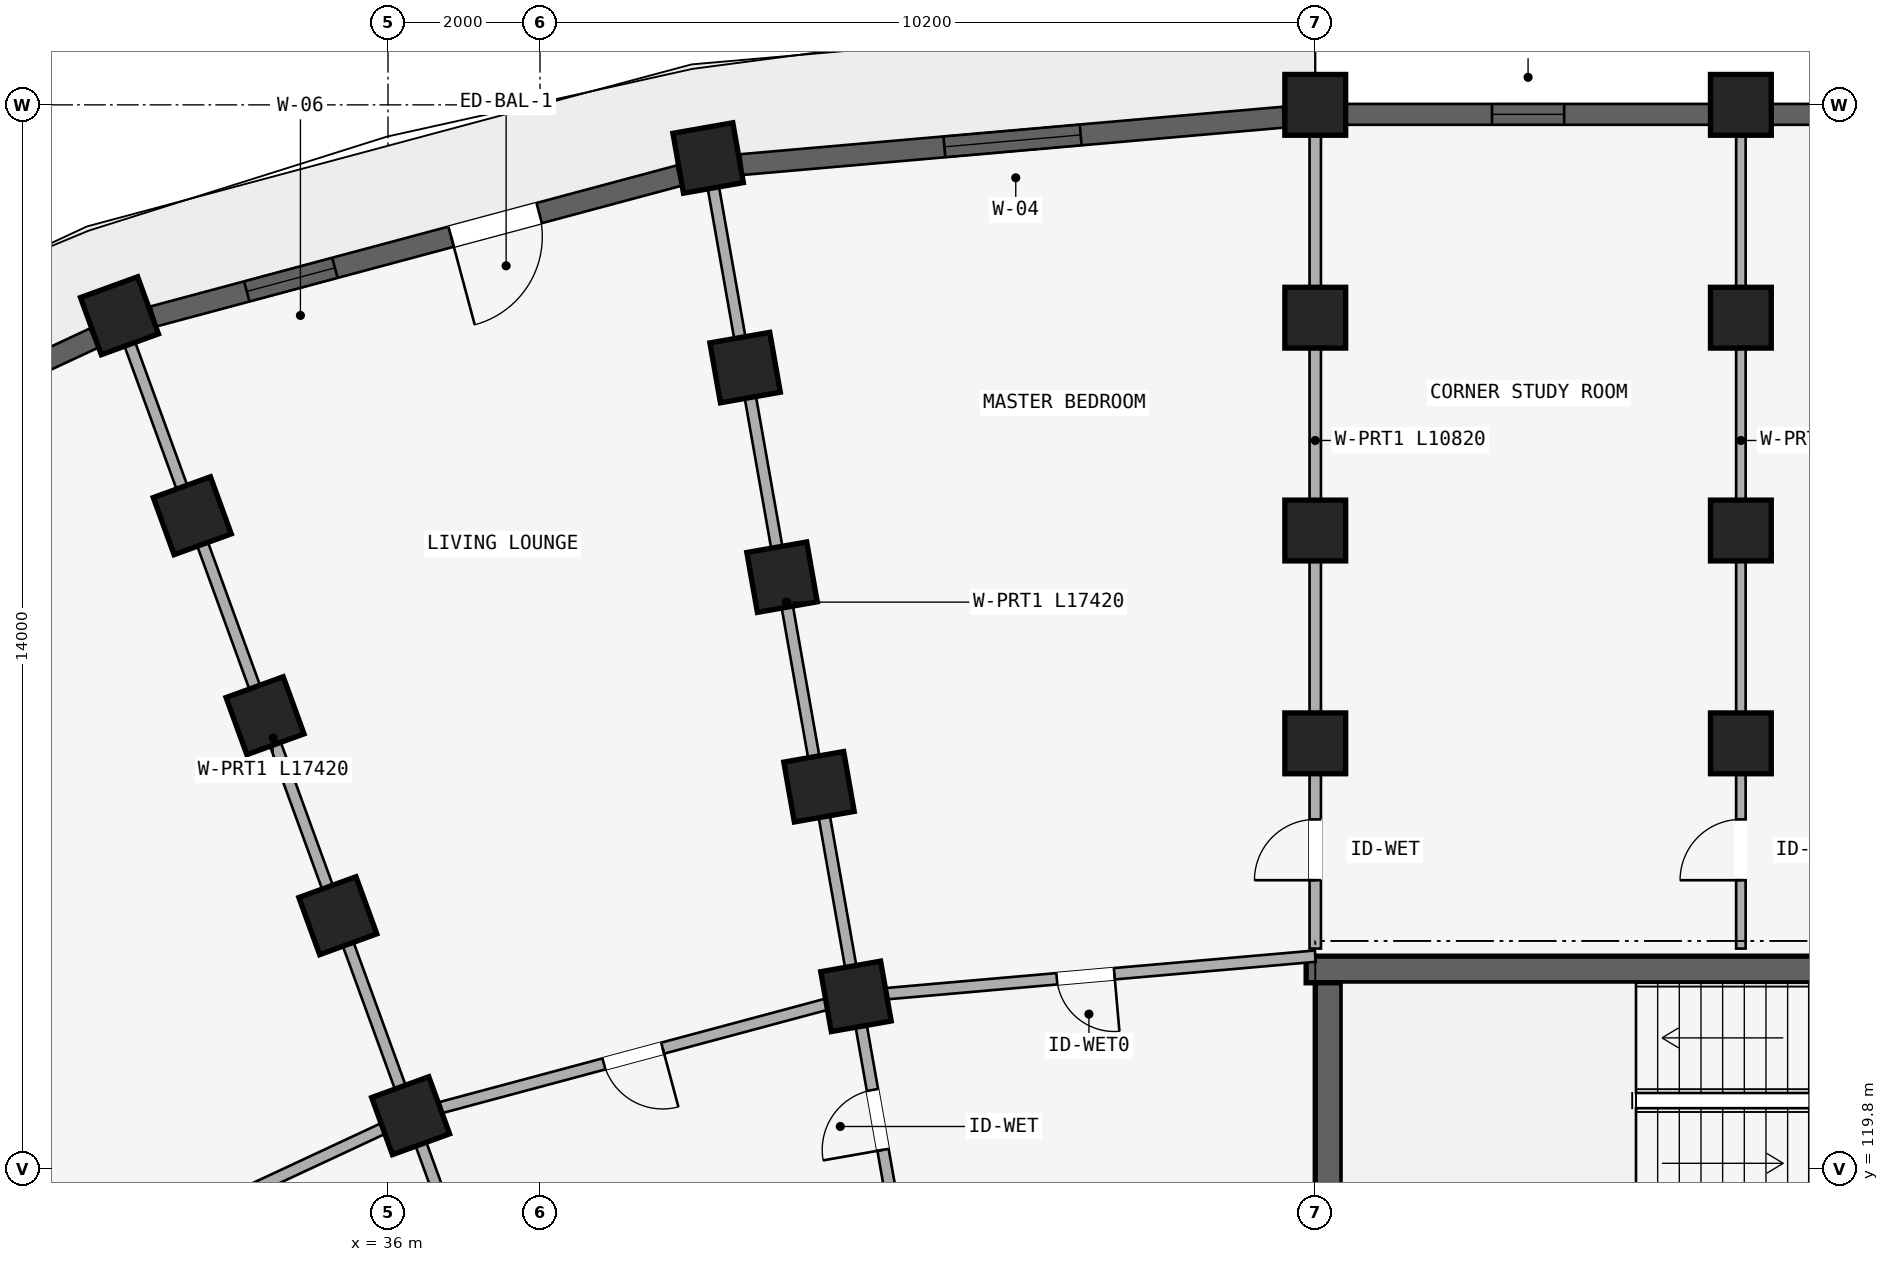
"""IFC4 building model, lengths in metres.
Left out: names, types, materials, properties, quantities, classifications, styles, units other than length and angle.
Written with IfcOpenShell. Run it as: python <this file> out.ifc"""

import sys

from ifc_helpers import new_model, si_unit, direction, frame, frame_2d, origin, origin_2d, place, context, subcontext, project, spatial, rectangle, extrude, element, fill, save


model = new_model("IFC4")
c1 = context("Model", 3, precision=1e-05, world=origin(), true_north=direction((0.0, 1.0)))
c2 = subcontext(c1, "Body", "Model", "MODEL_VIEW")
j1 = project(units=[si_unit("LENGTHUNIT", "METRE"), si_unit("PLANEANGLEUNIT", "RADIAN")], contexts=[c1])
p1 = place(None, origin())
s1 = spatial("IfcSite", under=j1, at=p1, CompositionType="ELEMENT")
p2 = place(p1, origin())
s2 = spatial("IfcBuilding", under=s1, at=p2, CompositionType="ELEMENT")
p3 = place(p2, frame((0.0, 0.0, 8.7)))
s3 = spatial("IfcBuildingStorey", under=s2, at=p3, CompositionType="ELEMENT", Elevation=8.7)
p4 = place(p3, frame((48.08, 122.425, 0.0), z_axis=(0.0, 0.0, 1.0), x_axis=(1.0, 0.0, 0.0)))
e1 = element("IfcWall", 1, at=p4, inside=s3, PredefinedType="SHEAR", context=c2, shape_type="SweptSolid", body=[
    extrude(rectangle(XDim=8.545, YDim=0.35, at=frame_2d((4.272, 0.0))), origin(), (0.0, 0.0, 1.0), 2.93),
])
p5 = place(p3, frame((48.375, 118.65, 0.0), z_axis=(0.0, 0.0, 1.0), x_axis=(0.0, 1.0, 0.0)))
e2 = element("IfcWall", 2, at=p5, inside=s3, PredefinedType="SHEAR", context=c2, shape_type="SweptSolid", body=[
    extrude(rectangle(XDim=3.6, YDim=0.35, at=frame_2d((1.8, 0.0))), origin(), (0.0, 0.0, 1.0), 2.93),
])
for number, where, z_axis, x_axis in (
    (3, (48.2, 125.4, 0.0), (0.0, 0.0, 1.0), (1.0, 0.0, 0.0)),
    (4, (48.2, 128.2, 0.0), (0.0, 0.0, 1.0), (1.0, 0.0, 0.0)),
    (5, (48.2, 131.0, 0.0), (0.0, 0.0, 1.0), (1.0, 0.0, 0.0)),
    (6, (48.2, 133.8, 0.0), (0.0, 0.0, 1.0), (1.0, 0.0, 0.0)),
    (7, (42.157, 122.071, 0.0), (0.0, 0.0, 1.0), (0.985, 0.174, 0.0)),
    (8, (41.671, 124.829, 0.0), (0.0, 0.0, 1.0), (0.985, 0.174, 0.0)),
    (9, (41.185, 127.586, 0.0), (0.0, 0.0, 1.0), (0.985, 0.174, 0.0)),
    (10, (40.698, 130.344, 0.0), (0.0, 0.0, 1.0), (0.985, 0.174, 0.0)),
    (11, (40.212, 133.101, 0.0), (0.0, 0.0, 1.0), (0.985, 0.174, 0.0)),
    (12, (36.298, 120.501, 0.0), (0.0, 0.0, 1.0), (0.94, 0.342, 0.0)),
    (13, (35.34, 123.132, 0.0), (0.0, 0.0, 1.0), (0.94, 0.342, 0.0)),
    (14, (34.382, 125.764, 0.0), (0.0, 0.0, 1.0), (0.94, 0.342, 0.0)),
    (15, (33.425, 128.395, 0.0), (0.0, 0.0, 1.0), (0.94, 0.342, 0.0)),
    (16, (32.467, 131.026, 0.0), (0.0, 0.0, 1.0), (0.94, 0.342, 0.0)),
    (17, (53.8, 125.4, 0.0), (0.0, 0.0, 1.0), (1.0, 0.0, 0.0)),
    (18, (53.8, 128.2, 0.0), (0.0, 0.0, 1.0), (1.0, 0.0, 0.0)),
    (19, (53.8, 131.0, 0.0), (0.0, 0.0, 1.0), (1.0, 0.0, 0.0)),
    (20, (53.8, 133.8, 0.0), (0.0, 0.0, 1.0), (1.0, 0.0, 0.0)),
):
    element("IfcColumn", number, at=place(p3, frame(where, z_axis=z_axis, x_axis=x_axis)), inside=s3, PredefinedType="COLUMN", context=c2, shape_type="SweptSolid", body=[
        extrude(rectangle(XDim=0.8, YDim=0.8, at=origin_2d()), origin(), (0.0, 0.0, 1.0), 2.93),
    ])
p6 = place(p3, frame((53.8, 122.7, 0.0), z_axis=(0.0, 0.0, 1.0), x_axis=(0.0, 1.0, 0.0)))
e21 = element("IfcWall", 21, at=p6, inside=s3, PredefinedType="PARTITIONING", context=c2, shape_type="SweptSolid", body=[
    extrude(rectangle(XDim=10.82, YDim=0.125, at=frame_2d((5.41, 0.0))), origin(), (0.0, 0.0, 1.0), 2.372),
])
p7 = place(p6, frame((0.899, 0.0, 0.0)))
e22 = element("IfcOpeningElement", 22, at=p7, cuts=e21, PredefinedType="OPENING", context=c2, shape_type="SweptSolid", body=[
    extrude(rectangle(XDim=0.8, YDim=2.1, at=frame_2d((0.4, 1.05))), frame((0.0, 0.073, 0.0), z_axis=(0.0, -1.0, 0.0), x_axis=(1.0, 0.0, 0.0)), (0.0, 0.0, 1.0), 0.145),
])
p8 = place(p3, frame((48.2, 122.7, 0.0), z_axis=(0.0, 0.0, 1.0), x_axis=(0.0, 1.0, 0.0)))
e23 = element("IfcWall", 23, at=p8, inside=s3, PredefinedType="PARTITIONING", context=c2, shape_type="SweptSolid", body=[
    extrude(rectangle(XDim=10.82, YDim=0.15, at=frame_2d((5.41, 0.0))), origin(), (0.0, 0.0, 1.0), 2.372),
])
p9 = place(p8, frame((0.899, 0.0, 0.0)))
e24 = element("IfcOpeningElement", 24, at=p9, cuts=e23, PredefinedType="OPENING", context=c2, shape_type="SweptSolid", body=[
    extrude(rectangle(XDim=0.8, YDim=2.1, at=frame_2d((0.4, 1.05))), frame((0.0, 0.085, 0.0), z_axis=(0.0, -1.0, 0.0), x_axis=(1.0, 0.0, 0.0)), (0.0, 0.0, 1.0), 0.17),
])
p10 = place(p3, frame((43.286, 115.67, 0.0), z_axis=(0.0, 0.0, 1.0), x_axis=(-0.173646216546, 0.984808098809, 0.0)))
e25 = element("IfcWall", 25, at=p10, inside=s3, PredefinedType="PARTITIONING", context=c2, shape_type="SweptSolid", body=[
    extrude(rectangle(XDim=17.42, YDim=0.15, at=frame_2d((8.71, 0.0))), origin(), (0.0, 0.0, 1.0), 2.372),
])
p11 = place(p10, frame((4.45, 0.0, 0.0)))
e26 = element("IfcOpeningElement", 26, at=p11, cuts=e25, PredefinedType="OPENING", context=c2, shape_type="SweptSolid", body=[
    extrude(rectangle(XDim=0.8, YDim=2.1, at=frame_2d((0.4, 1.05))), frame((0.0, 0.085, 0.0), z_axis=(0.0, -1.0, 0.0), x_axis=(1.0, 0.0, 0.0)), (0.0, 0.0, 1.0), 0.17),
])
p12 = place(p3, frame((38.521, 114.393, 0.0), z_axis=(0.0, 0.0, 1.0), x_axis=(-0.342022120477, 0.939691901159, 0.0)))
e27 = element("IfcWall", 27, at=p12, inside=s3, PredefinedType="PARTITIONING", context=c2, shape_type="SweptSolid", body=[
    extrude(rectangle(XDim=17.42, YDim=0.15, at=frame_2d((8.71, 0.0))), origin(), (0.0, 0.0, 1.0), 2.372),
])
p13 = place(p12, frame((4.45, 0.0, 0.0)))
e28 = element("IfcOpeningElement", 28, at=p13, cuts=e27, PredefinedType="OPENING", context=c2, shape_type="SweptSolid", body=[
    extrude(rectangle(XDim=0.8, YDim=2.1, at=frame_2d((0.4, 1.05))), frame((0.0, 0.085, 0.0), z_axis=(0.0, -1.0, 0.0), x_axis=(1.0, 0.0, 0.0)), (0.0, 0.0, 1.0), 0.17),
])
p14 = place(p3, frame((34.05, 112.309, 0.0), z_axis=(0.0, 0.0, 1.0), x_axis=(-0.499997843263, 0.866026648973, 0.0)))
e29 = element("IfcWall", 29, at=p14, inside=s3, PredefinedType="STANDARD", context=c2, shape_type="SweptSolid", body=[
    extrude(rectangle(XDim=17.42, YDim=0.23, at=frame_2d((8.71, 0.0))), origin(), (0.0, 0.0, 1.0), 2.372),
])
p15 = place(p3, frame((48.2, 122.6, 0.0), z_axis=(0.0, 0.0, 1.0), x_axis=(-0.996193018494, -0.087174938512, 0.0)))
e30 = element("IfcWall", 30, at=p15, inside=s3, PredefinedType="PLUMBINGWALL", context=c2, shape_type="SweptSolid", body=[
    extrude(rectangle(XDim=6.066, YDim=0.15, at=frame_2d((3.033, 0.0))), origin(), (0.0, 0.0, 1.0), 2.372),
])
p16 = place(p15, frame((2.653, 0.0, 0.0)))
e31 = element("IfcOpeningElement", 31, at=p16, cuts=e30, PredefinedType="OPENING", context=c2, shape_type="SweptSolid", body=[
    extrude(rectangle(XDim=0.76, YDim=2.05, at=frame_2d((0.38, 1.025))), frame((0.0, 0.085, 0.0), z_axis=(0.0, -1.0, 0.0), x_axis=(1.0, 0.0, 0.0)), (0.0, 0.0, 1.0), 0.17),
])
p17 = place(p3, frame((42.157, 122.071, 0.0), z_axis=(0.0, 0.0, 1.0), x_axis=(-0.965923618901, -0.258827283048, 0.0)))
e32 = element("IfcWall", 32, at=p17, inside=s3, PredefinedType="PLUMBINGWALL", context=c2, shape_type="SweptSolid", body=[
    extrude(rectangle(XDim=6.066, YDim=0.15, at=frame_2d((3.033, 0.0))), origin(), (0.0, 0.0, 1.0), 2.372),
])
p18 = place(p17, frame((2.633, 0.0, 0.0)))
e33 = element("IfcOpeningElement", 33, at=p18, cuts=e32, PredefinedType="OPENING", context=c2, shape_type="SweptSolid", body=[
    extrude(rectangle(XDim=0.8, YDim=2.1, at=frame_2d((0.4, 1.05))), frame((0.0, 0.085, 0.0), z_axis=(0.0, -1.0, 0.0), x_axis=(1.0, 0.0, 0.0)), (0.0, 0.0, 1.0), 0.17),
])
p19 = place(p3, frame((36.298, 120.501, 0.0), z_axis=(0.0, 0.0, 1.0), x_axis=(-0.906312656069, -0.42260781991, 0.0)))
e34 = element("IfcWall", 34, at=p19, inside=s3, PredefinedType="PLUMBINGWALL", context=c2, shape_type="SweptSolid", body=[
    extrude(rectangle(XDim=6.066, YDim=0.15, at=frame_2d((3.033, 0.0))), origin(), (0.0, 0.0, 1.0), 2.372),
])
p20 = place(p19, frame((2.613, 0.0, 0.0)))
e35 = element("IfcOpeningElement", 35, at=p20, cuts=e34, PredefinedType="OPENING", context=c2, shape_type="SweptSolid", body=[
    extrude(rectangle(XDim=0.84, YDim=2.1, at=frame_2d((0.42, 1.05))), frame((0.0, 0.085, 0.0), z_axis=(0.0, -1.0, 0.0), x_axis=(1.0, 0.0, 0.0)), (0.0, 0.0, 1.0), 0.17),
])
p21 = place(p3, frame((47.785, 133.638, 0.0), z_axis=(0.0, 0.0, 1.0), x_axis=(-0.99619608453, -0.08713989423, 0.0)))
e36 = element("IfcWall", 36, at=p21, inside=s3, PredefinedType="STANDARD", context=c2, shape_type="SweptSolid", body=[
    extrude(rectangle(XDim=7.164, YDim=0.275, at=frame_2d((3.582, 0.0))), origin(), (0.0, 0.0, 1.0), 2.472),
])
p22 = place(p21, frame((2.682, 0.0, 0.622)))
e37 = element("IfcOpeningElement", 37, at=p22, cuts=e36, PredefinedType="OPENING", context=c2, shape_type="SweptSolid", body=[
    extrude(rectangle(XDim=1.8, YDim=1.65, at=frame_2d((0.9, 0.825))), frame((0.0, 0.147, 0.0), z_axis=(0.0, -1.0, 0.0), x_axis=(1.0, 0.0, 0.0)), (0.0, 0.0, 1.0), 0.295),
])
p23 = place(p3, frame((39.832, 132.87, 0.0), z_axis=(0.0, 0.0, 1.0), x_axis=(-0.965923712619, -0.258826933296, 0.0)))
e38 = element("IfcWall", 38, at=p23, inside=s3, PredefinedType="STANDARD", context=c2, shape_type="SweptSolid", body=[
    extrude(rectangle(XDim=7.164, YDim=0.275, at=frame_2d((3.582, 0.0))), origin(), (0.0, 0.0, 1.0), 2.472),
])
p24 = place(p23, frame((4.69, 0.0, 0.522)))
e39 = element("IfcOpeningElement", 39, at=p24, cuts=e38, PredefinedType="OPENING", context=c2, shape_type="SweptSolid", body=[
    extrude(rectangle(XDim=1.2, YDim=1.5, at=frame_2d((0.6, 0.75))), frame((0.0, 0.147, 0.0), z_axis=(0.0, -1.0, 0.0), x_axis=(1.0, 0.0, 0.0)), (0.0, 0.0, 1.0), 0.295),
])
p25 = place(p23, frame((1.907, 0.0, 0.0)))
e40 = element("IfcOpeningElement", 40, at=p25, cuts=e38, PredefinedType="OPENING", context=c2, shape_type="SweptSolid", body=[
    extrude(rectangle(XDim=1.2, YDim=2.15, at=frame_2d((0.6, 1.075))), frame((0.0, 0.147, 0.0), z_axis=(0.0, -1.0, 0.0), x_axis=(1.0, 0.0, 0.0)), (0.0, 0.0, 1.0), 0.295),
])
p26 = place(p3, frame((32.133, 130.732, 0.0), z_axis=(0.0, 0.0, 1.0), x_axis=(-0.906300636296, -0.422633596215, 0.0)))
e41 = element("IfcWall", 41, at=p26, inside=s3, PredefinedType="STANDARD", context=c2, shape_type="SweptSolid", body=[
    extrude(rectangle(XDim=7.164, YDim=0.275, at=frame_2d((3.582, 0.0))), origin(), (0.0, 0.0, 1.0), 2.472),
])
p27 = place(p26, frame((2.457, 0.0, 0.322)))
e42 = element("IfcOpeningElement", 42, at=p27, cuts=e41, PredefinedType="OPENING", context=c2, shape_type="SweptSolid", body=[
    extrude(rectangle(XDim=2.25, YDim=1.95, at=frame_2d((1.125, 0.975))), frame((0.0, 0.147, 0.0), z_axis=(0.0, -1.0, 0.0), x_axis=(1.0, 0.0, 0.0)), (0.0, 0.0, 1.0), 0.295),
])
p28 = place(p3, frame((48.604, 133.675, 0.0), z_axis=(0.0, 0.0, 1.0), x_axis=(1.0, 0.0, 0.0)))
e43 = element("IfcWall", 43, at=p28, inside=s3, PredefinedType="STANDARD", context=c2, shape_type="SweptSolid", body=[
    extrude(rectangle(XDim=4.793, YDim=0.275, at=frame_2d((2.396, 0.0))), origin(), (0.0, 0.0, 1.0), 2.472),
])
p29 = place(p28, frame((1.921, 0.0, 0.88)))
e44 = element("IfcOpeningElement", 44, at=p29, cuts=e43, PredefinedType="OPENING", context=c2, shape_type="SweptSolid", body=[
    extrude(rectangle(XDim=0.95, YDim=1.35, at=frame_2d((0.475, 0.675))), frame((0.0, 0.147, 0.0), z_axis=(0.0, -1.0, 0.0), x_axis=(1.0, 0.0, 0.0)), (0.0, 0.0, 1.0), 0.295),
])
p30 = place(p3, frame((54.204, 133.675, 0.0), z_axis=(0.0, 0.0, 1.0), x_axis=(1.0, 0.0, 0.0)))
e45 = element("IfcWall", 45, at=p30, inside=s3, PredefinedType="STANDARD", context=c2, shape_type="SweptSolid", body=[
    extrude(rectangle(XDim=4.793, YDim=0.275, at=frame_2d((2.396, 0.0))), origin(), (0.0, 0.0, 1.0), 2.472),
])
p31 = place(p30, frame((1.721, 0.0, 0.672)))
e46 = element("IfcOpeningElement", 46, at=p31, cuts=e45, PredefinedType="OPENING", context=c2, shape_type="SweptSolid", body=[
    extrude(rectangle(XDim=1.35, YDim=1.6, at=frame_2d((0.675, 0.8))), frame((0.0, 0.147, 0.0), z_axis=(0.0, -1.0, 0.0), x_axis=(1.0, 0.0, 0.0)), (0.0, 0.0, 1.0), 0.295),
])
p32 = place(p22, origin())
e47 = element("IfcWindow", 47, at=p32, inside=s3, PartitioningType="DOUBLE_PANEL_VERTICAL", PredefinedType="WINDOW", context=c2, shape_type="SweptSolid", body=[
    extrude(rectangle(XDim=1.8, YDim=1.65, at=frame_2d((0.9, 0.825))), frame((0.0, 0.03, 0.0), z_axis=(0.0, -1.0, 0.0), x_axis=(1.0, 0.0, 0.0)), (0.0, 0.0, 1.0), 0.06),
])
fill(e37, e47)
p33 = place(p24, origin())
e48 = element("IfcWindow", 48, at=p33, inside=s3, PartitioningType="SINGLE_PANEL", PredefinedType="WINDOW", context=c2, shape_type="SweptSolid", body=[
    extrude(rectangle(XDim=1.2, YDim=1.5, at=frame_2d((0.6, 0.75))), frame((0.0, 0.03, 0.0), z_axis=(0.0, -1.0, 0.0), x_axis=(1.0, 0.0, 0.0)), (0.0, 0.0, 1.0), 0.06),
])
fill(e39, e48)
p34 = place(p29, origin())
e49 = element("IfcWindow", 49, at=p34, inside=s3, PartitioningType="SINGLE_PANEL", PredefinedType="WINDOW", context=c2, shape_type="SweptSolid", body=[
    extrude(rectangle(XDim=0.95, YDim=1.35, at=frame_2d((0.475, 0.675))), frame((0.0, 0.03, 0.0), z_axis=(0.0, -1.0, 0.0), x_axis=(1.0, 0.0, 0.0)), (0.0, 0.0, 1.0), 0.06),
])
fill(e44, e49)
p35 = place(p7, origin())
e50 = element("IfcDoor", 50, at=p35, inside=s3, OperationType="SINGLE_SWING_LEFT", PredefinedType="DOOR", context=c2, shape_type="SweptSolid", body=[
    extrude(rectangle(XDim=0.8, YDim=2.1, at=frame_2d((0.4, 1.05))), frame((0.0, 0.025, 0.0), z_axis=(0.0, -1.0, 0.0), x_axis=(1.0, 0.0, 0.0)), (0.0, 0.0, 1.0), 0.05),
])
fill(e22, e50)
p36 = place(p9, origin())
e51 = element("IfcDoor", 51, at=p36, inside=s3, OperationType="SINGLE_SWING_LEFT", PredefinedType="DOOR", context=c2, shape_type="SweptSolid", body=[
    extrude(rectangle(XDim=0.8, YDim=2.1, at=frame_2d((0.4, 1.05))), frame((0.0, 0.025, 0.0), z_axis=(0.0, -1.0, 0.0), x_axis=(1.0, 0.0, 0.0)), (0.0, 0.0, 1.0), 0.05),
])
fill(e24, e51)
p37 = place(p11, frame((0.8, 0.0, 0.0), z_axis=(0.0, 0.0, 1.0), x_axis=(-1.0, 0.0, 0.0)))
e52 = element("IfcDoor", 52, at=p37, inside=s3, OperationType="SINGLE_SWING_RIGHT", PredefinedType="DOOR", context=c2, shape_type="SweptSolid", body=[
    extrude(rectangle(XDim=0.8, YDim=2.1, at=frame_2d((0.4, 1.05))), frame((0.0, 0.025, 0.0), z_axis=(0.0, -1.0, 0.0), x_axis=(1.0, 0.0, 0.0)), (0.0, 0.0, 1.0), 0.05),
])
fill(e26, e52)
p38 = place(p16, frame((0.76, 0.0, 0.0), z_axis=(0.0, 0.0, 1.0), x_axis=(-1.0, 0.0, 0.0)))
e53 = element("IfcDoor", 53, at=p38, inside=s3, OperationType="SINGLE_SWING_RIGHT", PredefinedType="DOOR", context=c2, shape_type="SweptSolid", body=[
    extrude(rectangle(XDim=0.76, YDim=2.05, at=frame_2d((0.38, 1.025))), frame((0.0, 0.025, 0.0), z_axis=(0.0, -1.0, 0.0), x_axis=(1.0, 0.0, 0.0)), (0.0, 0.0, 1.0), 0.05),
])
fill(e31, e53)
p39 = place(p18, origin())
e54 = element("IfcDoor", 54, at=p39, inside=s3, OperationType="SINGLE_SWING_LEFT", PredefinedType="DOOR", context=c2, shape_type="SweptSolid", body=[
    extrude(rectangle(XDim=0.8, YDim=2.1, at=frame_2d((0.4, 1.05))), frame((0.0, 0.025, 0.0), z_axis=(0.0, -1.0, 0.0), x_axis=(1.0, 0.0, 0.0)), (0.0, 0.0, 1.0), 0.05),
])
fill(e33, e54)
p40 = place(p25, frame((1.2, 0.0, 0.0), z_axis=(0.0, 0.0, 1.0), x_axis=(-1.0, 0.0, 0.0)))
e55 = element("IfcDoor", 55, at=p40, inside=s3, OperationType="SINGLE_SWING_LEFT", PredefinedType="DOOR", context=c2, shape_type="SweptSolid", body=[
    extrude(rectangle(XDim=1.2, YDim=2.15, at=frame_2d((0.6, 1.075))), frame((0.0, 0.025, 0.0), z_axis=(0.0, -1.0, 0.0), x_axis=(1.0, 0.0, 0.0)), (0.0, 0.0, 1.0), 0.05),
])
fill(e40, e55)
save(model, sys.argv[1])
